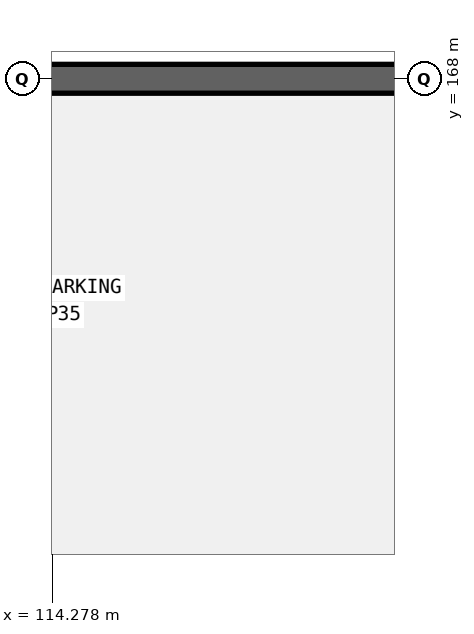
"""IFC4 building model, lengths in metres.
Left out: names, types, materials, properties, quantities, classifications, styles, units other than length and angle.
Written with IfcOpenShell. Run it as: python <this file> out.ifc"""

import sys

from ifc_helpers import new_model, si_unit, direction, frame, frame_2d, origin, place, context, subcontext, project, spatial, rectangle, extrude, element, save


model = new_model("IFC4")
c1 = context("Model", 3, precision=1e-05, world=origin(), true_north=direction((0.0, 1.0)))
c2 = subcontext(c1, "Body", "Model", "MODEL_VIEW")
j1 = project(units=[si_unit("LENGTHUNIT", "METRE"), si_unit("PLANEANGLEUNIT", "RADIAN")], contexts=[c1])
p1 = place(None, origin())
s1 = spatial("IfcSite", under=j1, at=p1, CompositionType="ELEMENT")
p2 = place(p1, origin())
s2 = spatial("IfcBuilding", under=s1, at=p2, CompositionType="ELEMENT")
p3 = place(p2, frame((0.0, 0.0, -4.8)))
s3 = spatial("IfcBuildingStorey", under=s2, at=p3, CompositionType="ELEMENT", Elevation=-4.8)
p4 = place(p3, frame((112.429, 168.0, 0.0), z_axis=(0.0, 0.0, 1.0), x_axis=(1.0, 0.0, 0.0)))
e1 = element("IfcWall", 1, at=p4, inside=s3, PredefinedType="STANDARD", context=c2, shape_type="SweptSolid", body=[
    extrude(rectangle(XDim=12.067, YDim=0.38, at=frame_2d((6.034, 0.0))), origin(), (0.0, 0.0, 1.0), 4.46),
])
save(model, sys.argv[1])
